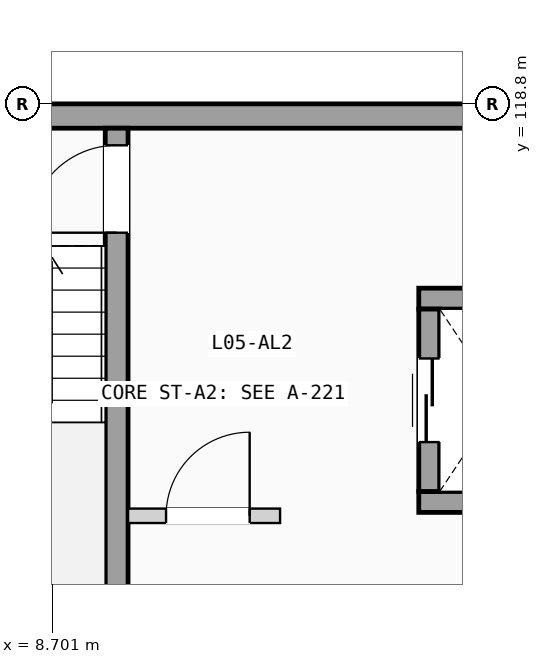
"""IFC4 building model, lengths in metres.
Left out: names, types, materials, properties, quantities, classifications, styles, units other than length and angle.
Written with IfcOpenShell. Run it as: python <this file> out.ifc"""

import sys

from ifc_helpers import new_model, si_unit, direction, frame, frame_2d, origin, place, context, subcontext, project, spatial, rectangle, extrude, element, fill, save


model = new_model("IFC4")
c1 = context("Model", 3, precision=1e-05, world=origin(), true_north=direction((0.0, 1.0)))
c2 = subcontext(c1, "Body", "Model", "MODEL_VIEW")
j1 = project(units=[si_unit("LENGTHUNIT", "METRE"), si_unit("PLANEANGLEUNIT", "RADIAN")], contexts=[c1])
p1 = place(None, origin())
s1 = spatial("IfcSite", under=j1, at=p1, CompositionType="ELEMENT")
p2 = place(p1, origin())
s2 = spatial("IfcBuilding", under=s1, at=p2, CompositionType="ELEMENT")
p3 = place(p2, frame((0.0, 0.0, 18.375)))
s3 = spatial("IfcBuildingStorey", under=s2, at=p3, CompositionType="ELEMENT", Elevation=18.375)
p4 = place(p3, frame((0.0, 118.64, 0.0), z_axis=(0.0, 0.0, 1.0), x_axis=(1.0, 0.0, 0.0)))
e1 = element("IfcWall", 1, at=p4, inside=s3, PredefinedType="SOLIDWALL", context=c2, shape_type="SweptSolid", body=[
    extrude(rectangle(XDim=21.6, YDim=0.32, at=frame_2d((10.8, 0.0))), origin(), (0.0, 0.0, 1.0), 2.89),
])
p5 = place(p3, frame((9.55, 111.48, 0.0), z_axis=(0.0, 0.0, 1.0), x_axis=(0.0, 1.0, 0.0)))
e2 = element("IfcWall", 2, at=p5, inside=s3, PredefinedType="SHEAR", context=c2, shape_type="SweptSolid", body=[
    extrude(rectangle(XDim=7.0, YDim=0.3, at=frame_2d((3.5, 0.0))), origin(), (0.0, 0.0, 1.0), 2.89),
])
p6 = place(p5, frame((5.625, 0.0, 0.0)))
e3 = element("IfcOpeningElement", 3, at=p6, cuts=e2, PredefinedType="OPENING", context=c2, shape_type="SweptSolid", body=[
    extrude(rectangle(XDim=1.15, YDim=2.12, at=frame_2d((0.575, 1.06))), frame((0.0, 0.16, 0.0), z_axis=(0.0, -1.0, 0.0), x_axis=(1.0, 0.0, 0.0)), (0.0, 0.0, 1.0), 0.32),
])
for number, where, z_axis, x_axis in (
    (4, (13.525, 113.562, 0.0), (0.0, 0.0, 1.0), (1.0, 0.0, 0.0)),
    (5, (13.525, 116.238, 0.0), (0.0, 0.0, 1.0), (1.0, 0.0, 0.0)),
):
    element("IfcWall", number, at=place(p3, frame(where, z_axis=z_axis, x_axis=x_axis)), inside=s3, PredefinedType="SHEAR", context=c2, shape_type="SweptSolid", body=[
        extrude(rectangle(XDim=2.15, YDim=0.275, at=frame_2d((1.075, 0.0))), origin(), (0.0, 0.0, 1.0), 2.89),
    ])
p7 = place(p3, frame((13.663, 113.7, 0.0), z_axis=(0.0, 0.0, 1.0), x_axis=(0.0, 1.0, 0.0)))
e6 = element("IfcWall", 6, at=p7, inside=s3, PredefinedType="SHEAR", context=c2, shape_type="SweptSolid", body=[
    extrude(rectangle(XDim=2.4, YDim=0.275, at=frame_2d((1.2, 0.0))), origin(), (0.0, 0.0, 1.0), 2.89),
])
p8 = place(p7, frame((0.65, 0.0, 0.0)))
e7 = element("IfcOpeningElement", 7, at=p8, cuts=e6, PredefinedType="OPENING", context=c2, shape_type="SweptSolid", body=[
    extrude(rectangle(XDim=1.1, YDim=2.15, at=frame_2d((0.55, 1.075))), frame((0.0, 0.147, 0.0), z_axis=(0.0, -1.0, 0.0), x_axis=(1.0, 0.0, 0.0)), (0.0, 0.0, 1.0), 0.295),
])
p9 = place(p3, frame((9.7, 113.38, 0.0), z_axis=(0.0, 0.0, 1.0), x_axis=(1.0, 0.0, 0.0)))
e8 = element("IfcWall", 8, at=p9, inside=s3, PredefinedType="PARTITIONING", context=c2, shape_type="SweptSolid", body=[
    extrude(rectangle(XDim=2.0, YDim=0.19, at=frame_2d((1.0, 0.0))), origin(), (0.0, 0.0, 1.0), 2.87),
])
p10 = place(p9, frame((0.5, 0.0, 0.0)))
e9 = element("IfcOpeningElement", 9, at=p10, cuts=e8, PredefinedType="OPENING", context=c2, shape_type="SweptSolid", body=[
    extrude(rectangle(XDim=1.1, YDim=2.12, at=frame_2d((0.55, 1.06))), frame((0.0, 0.105, 0.0), z_axis=(0.0, -1.0, 0.0), x_axis=(1.0, 0.0, 0.0)), (0.0, 0.0, 1.0), 0.21),
])
p11 = place(p6, origin())
e10 = element("IfcDoor", 10, at=p11, inside=s3, OperationType="SINGLE_SWING_LEFT", PredefinedType="DOOR", context=c2, shape_type="SweptSolid", body=[
    extrude(rectangle(XDim=1.15, YDim=2.12, at=frame_2d((0.575, 1.06))), frame((0.0, 0.025, 0.0), z_axis=(0.0, -1.0, 0.0), x_axis=(1.0, 0.0, 0.0)), (0.0, 0.0, 1.0), 0.05),
])
fill(e3, e10)
p12 = place(p8, origin())
e11 = element("IfcDoor", 11, at=p12, inside=s3, OperationType="SLIDING_TO_LEFT", PredefinedType="DOOR", context=c2, shape_type="SweptSolid", body=[
    extrude(rectangle(XDim=1.1, YDim=2.15, at=frame_2d((0.55, 1.075))), frame((0.0, 0.025, 0.0), z_axis=(0.0, -1.0, 0.0), x_axis=(1.0, 0.0, 0.0)), (0.0, 0.0, 1.0), 0.05),
])
fill(e7, e11)
p13 = place(p10, origin())
e12 = element("IfcDoor", 12, at=p13, inside=s3, OperationType="SINGLE_SWING_RIGHT", PredefinedType="DOOR", context=c2, shape_type="SweptSolid", body=[
    extrude(rectangle(XDim=1.1, YDim=2.12, at=frame_2d((0.55, 1.06))), frame((0.0, 0.025, 0.0), z_axis=(0.0, -1.0, 0.0), x_axis=(1.0, 0.0, 0.0)), (0.0, 0.0, 1.0), 0.05),
])
fill(e9, e12)
save(model, sys.argv[1])
